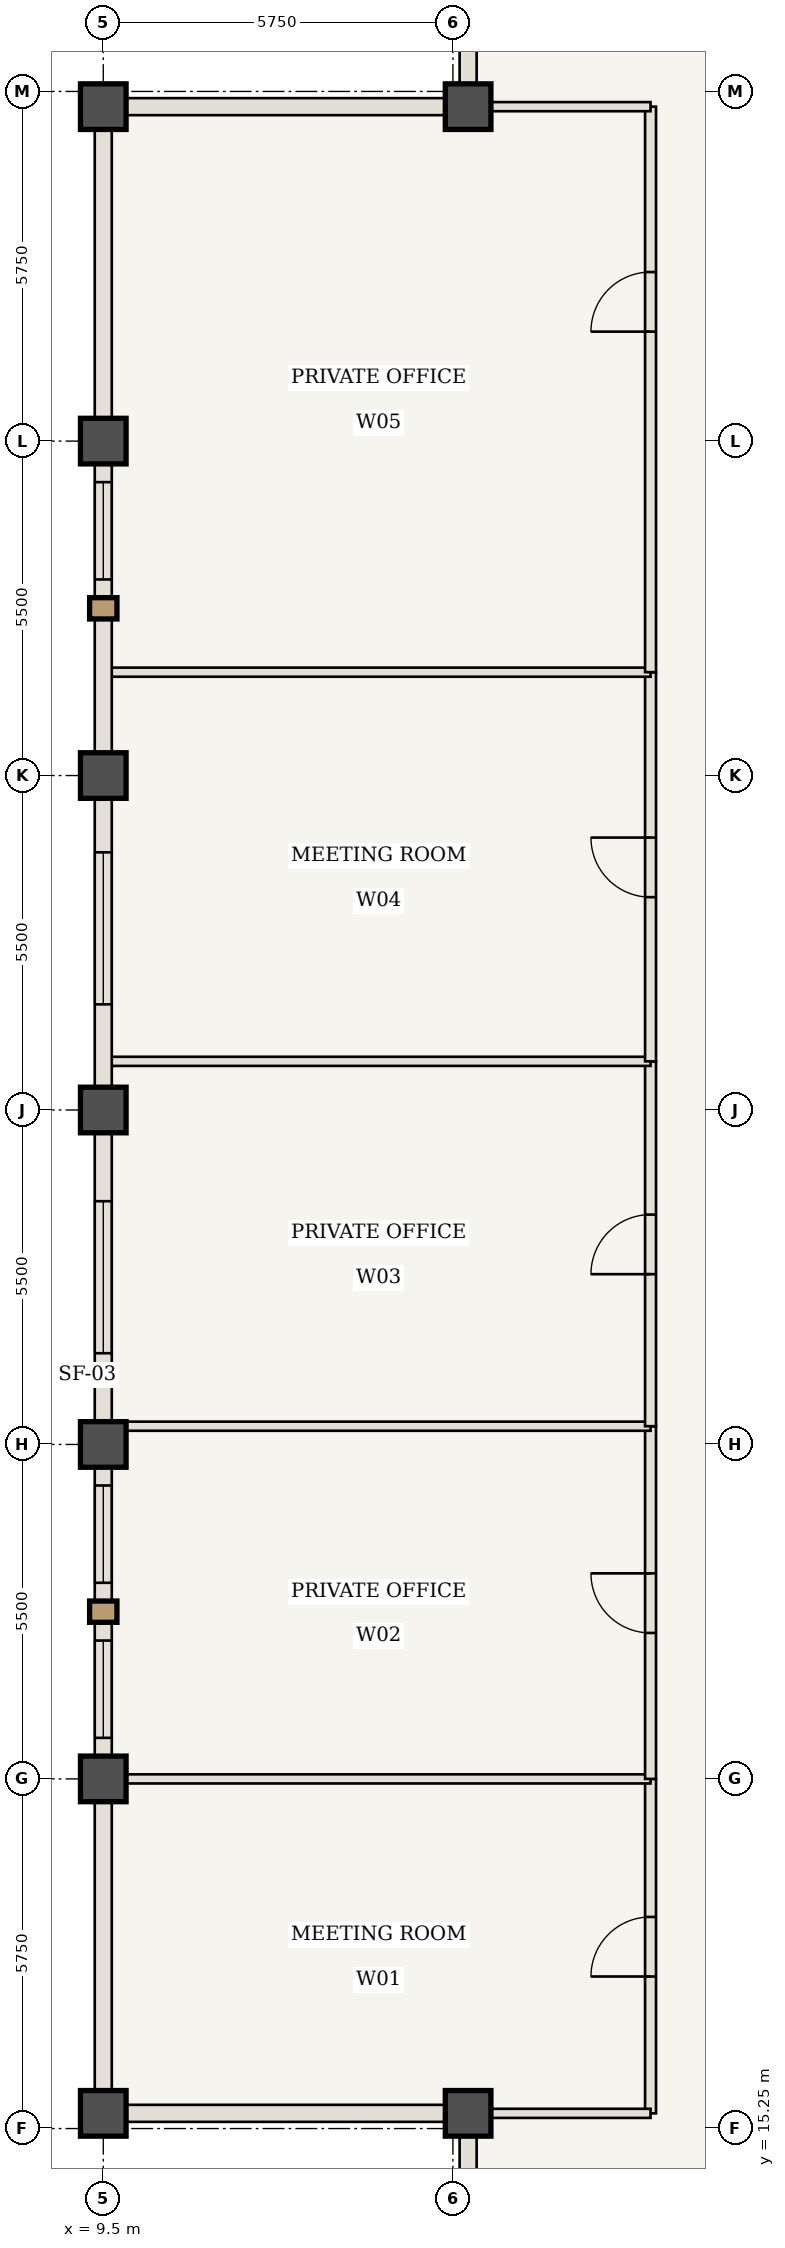
"""IFC4 building model, lengths in metres.
Left out: names, types, materials, properties, quantities, classifications, styles, units other than length and angle.
Written with IfcOpenShell. Run it as: python <this file> out.ifc"""

import sys

from ifc_helpers import new_model, si_unit, direction, frame, frame_2d, origin, origin_2d, place, context, subcontext, project, spatial, rectangle, extrude, element, fill, save


model = new_model("IFC4")
c1 = context("Model", 3, precision=1e-05, world=origin(), true_north=direction((0.0, 1.0)))
c2 = subcontext(c1, "Body", "Model", "MODEL_VIEW")
j1 = project(units=[si_unit("LENGTHUNIT", "METRE"), si_unit("PLANEANGLEUNIT", "RADIAN")], contexts=[c1])
p1 = place(None, origin())
s1 = spatial("IfcSite", under=j1, at=p1, CompositionType="ELEMENT")
p2 = place(p1, origin())
s2 = spatial("IfcBuilding", under=s1, at=p2, CompositionType="ELEMENT")
p3 = place(p2, frame((0.0, 0.0, 292.95)))
s3 = spatial("IfcBuildingStorey", under=s2, at=p3, CompositionType="ELEMENT", Elevation=292.95)
for number, where, z_axis, x_axis in (
    (1, (15.5, 15.5, 0.0), (0.0, 0.0, 1.0), (1.0, 0.0, 0.0)),
    (2, (9.5, 15.5, 0.0), (0.0, 0.0, 1.0), (1.0, 0.0, 0.0)),
    (3, (15.5, 48.5, 0.0), (0.0, 0.0, 1.0), (1.0, 0.0, 0.0)),
    (4, (9.5, 48.5, 0.0), (0.0, 0.0, 1.0), (1.0, 0.0, 0.0)),
    (5, (9.5, 21.0, 0.0), (0.0, 0.0, 1.0), (1.0, 0.0, 0.0)),
    (6, (9.5, 26.5, 0.0), (0.0, 0.0, 1.0), (1.0, 0.0, 0.0)),
    (7, (9.5, 32.0, 0.0), (0.0, 0.0, 1.0), (1.0, 0.0, 0.0)),
    (8, (9.5, 37.5, 0.0), (0.0, 0.0, 1.0), (1.0, 0.0, 0.0)),
    (9, (9.5, 43.0, 0.0), (0.0, 0.0, 1.0), (1.0, 0.0, 0.0)),
):
    element("IfcColumn", number, at=place(p3, frame(where, z_axis=z_axis, x_axis=x_axis)), inside=s3, PredefinedType="COLUMN", context=c2, shape_type="SweptSolid", body=[
        extrude(rectangle(XDim=0.75, YDim=0.75, at=origin_2d()), origin(), (0.0, 0.0, 1.0), 3.85),
    ])
p4 = place(p3, frame((18.5, 15.5, 0.0), z_axis=(0.0, 0.0, 1.0), x_axis=(0.0, 1.0, 0.0)))
e10 = element("IfcWall", 10, at=p4, inside=s3, PredefinedType="STANDARD", context=c2, shape_type="SweptSolid", body=[
    extrude(rectangle(XDim=5.5, YDim=0.18, at=frame_2d((2.75, 0.0))), origin(), (0.0, 0.0, 1.0), 3.685),
])
p5 = place(p4, frame((2.25, 0.0, 0.0)))
e11 = element("IfcOpeningElement", 11, at=p5, cuts=e10, PredefinedType="OPENING", context=c2, shape_type="SweptSolid", body=[
    extrude(rectangle(XDim=0.98, YDim=2.2, at=frame_2d((0.49, 1.1))), frame((0.0, 0.1, 0.0), z_axis=(0.0, -1.0, 0.0), x_axis=(1.0, 0.0, 0.0)), (0.0, 0.0, 1.0), 0.2),
])
p6 = place(p3, frame((9.56, 21.0, 0.0), z_axis=(0.0, 0.0, 1.0), x_axis=(1.0, 0.0, 0.0)))
e12 = element("IfcWall", 12, at=p6, inside=s3, PredefinedType="STANDARD", context=c2, shape_type="SweptSolid", body=[
    extrude(rectangle(XDim=8.94, YDim=0.15, at=frame_2d((4.47, 0.0))), origin(), (0.0, 0.0, 1.0), 3.685),
])
p7 = place(p3, frame((18.5, 21.0, 0.0), z_axis=(0.0, 0.0, 1.0), x_axis=(0.0, 1.0, 0.0)))
e13 = element("IfcWall", 13, at=p7, inside=s3, PredefinedType="STANDARD", context=c2, shape_type="SweptSolid", body=[
    extrude(rectangle(XDim=5.8, YDim=0.18, at=frame_2d((2.9, 0.0))), origin(), (0.0, 0.0, 1.0), 3.685),
])
p8 = place(p7, frame((2.4, 0.0, 0.0)))
e14 = element("IfcOpeningElement", 14, at=p8, cuts=e13, PredefinedType="OPENING", context=c2, shape_type="SweptSolid", body=[
    extrude(rectangle(XDim=0.98, YDim=2.2, at=frame_2d((0.49, 1.1))), frame((0.0, 0.1, 0.0), z_axis=(0.0, -1.0, 0.0), x_axis=(1.0, 0.0, 0.0)), (0.0, 0.0, 1.0), 0.2),
])
p9 = place(p3, frame((9.56, 26.8, 0.0), z_axis=(0.0, 0.0, 1.0), x_axis=(1.0, 0.0, 0.0)))
e15 = element("IfcWall", 15, at=p9, inside=s3, PredefinedType="STANDARD", context=c2, shape_type="SweptSolid", body=[
    extrude(rectangle(XDim=8.94, YDim=0.15, at=frame_2d((4.47, 0.0))), origin(), (0.0, 0.0, 1.0), 3.685),
])
p10 = place(p3, frame((18.5, 26.8, 0.0), z_axis=(0.0, 0.0, 1.0), x_axis=(0.0, 1.0, 0.0)))
e16 = element("IfcWall", 16, at=p10, inside=s3, PredefinedType="STANDARD", context=c2, shape_type="SweptSolid", body=[
    extrude(rectangle(XDim=6.0, YDim=0.18, at=frame_2d((3.0, 0.0))), origin(), (0.0, 0.0, 1.0), 3.685),
])
p11 = place(p10, frame((2.5, 0.0, 0.0)))
e17 = element("IfcOpeningElement", 17, at=p11, cuts=e16, PredefinedType="OPENING", context=c2, shape_type="SweptSolid", body=[
    extrude(rectangle(XDim=0.98, YDim=2.2, at=frame_2d((0.49, 1.1))), frame((0.0, 0.1, 0.0), z_axis=(0.0, -1.0, 0.0), x_axis=(1.0, 0.0, 0.0)), (0.0, 0.0, 1.0), 0.2),
])
p12 = place(p3, frame((9.56, 32.8, 0.0), z_axis=(0.0, 0.0, 1.0), x_axis=(1.0, 0.0, 0.0)))
e18 = element("IfcWall", 18, at=p12, inside=s3, PredefinedType="STANDARD", context=c2, shape_type="SweptSolid", body=[
    extrude(rectangle(XDim=8.94, YDim=0.15, at=frame_2d((4.47, 0.0))), origin(), (0.0, 0.0, 1.0), 3.685),
])
p13 = place(p3, frame((18.5, 32.8, 0.0), z_axis=(0.0, 0.0, 1.0), x_axis=(0.0, 1.0, 0.0)))
e19 = element("IfcWall", 19, at=p13, inside=s3, PredefinedType="STANDARD", context=c2, shape_type="SweptSolid", body=[
    extrude(rectangle(XDim=6.4, YDim=0.18, at=frame_2d((3.2, 0.0))), origin(), (0.0, 0.0, 1.0), 3.685),
])
p14 = place(p13, frame((2.7, 0.0, 0.0)))
e20 = element("IfcOpeningElement", 20, at=p14, cuts=e19, PredefinedType="OPENING", context=c2, shape_type="SweptSolid", body=[
    extrude(rectangle(XDim=0.98, YDim=2.2, at=frame_2d((0.49, 1.1))), frame((0.0, 0.1, 0.0), z_axis=(0.0, -1.0, 0.0), x_axis=(1.0, 0.0, 0.0)), (0.0, 0.0, 1.0), 0.2),
])
p15 = place(p3, frame((9.56, 39.2, 0.0), z_axis=(0.0, 0.0, 1.0), x_axis=(1.0, 0.0, 0.0)))
e21 = element("IfcWall", 21, at=p15, inside=s3, PredefinedType="STANDARD", context=c2, shape_type="SweptSolid", body=[
    extrude(rectangle(XDim=8.94, YDim=0.15, at=frame_2d((4.47, 0.0))), origin(), (0.0, 0.0, 1.0), 3.685),
])
p16 = place(p3, frame((18.5, 39.2, 0.0), z_axis=(0.0, 0.0, 1.0), x_axis=(0.0, 1.0, 0.0)))
e22 = element("IfcWall", 22, at=p16, inside=s3, PredefinedType="STANDARD", context=c2, shape_type="SweptSolid", body=[
    extrude(rectangle(XDim=9.3, YDim=0.18, at=frame_2d((4.65, 0.0))), origin(), (0.0, 0.0, 1.0), 3.685),
])
p17 = place(p16, frame((5.6, 0.0, 0.0)))
e23 = element("IfcOpeningElement", 23, at=p17, cuts=e22, PredefinedType="OPENING", context=c2, shape_type="SweptSolid", body=[
    extrude(rectangle(XDim=0.98, YDim=2.2, at=frame_2d((0.49, 1.1))), frame((0.0, 0.1, 0.0), z_axis=(0.0, -1.0, 0.0), x_axis=(1.0, 0.0, 0.0)), (0.0, 0.0, 1.0), 0.2),
])
for number, where, z_axis, x_axis in (
    (24, (15.5, 15.5, 0.0), (0.0, 0.0, 1.0), (1.0, 0.0, 0.0)),
    (25, (15.5, 48.5, 0.0), (0.0, 0.0, 1.0), (1.0, 0.0, 0.0)),
):
    element("IfcWall", number, at=place(p3, frame(where, z_axis=z_axis, x_axis=x_axis)), inside=s3, PredefinedType="STANDARD", context=c2, shape_type="SweptSolid", body=[
        extrude(rectangle(XDim=3.0, YDim=0.15, at=frame_2d((1.5, 0.0))), origin(), (0.0, 0.0, 1.0), 3.685),
    ])
p18 = place(p3, frame((9.5, 15.5, 0.0), z_axis=(0.0, 0.0, 1.0), x_axis=(0.0, 1.0, 0.0)))
e26 = element("IfcWall", 26, at=p18, inside=s3, PredefinedType="USERDEFINED", context=c2, shape_type="SweptSolid", body=[
    extrude(rectangle(XDim=5.5, YDim=0.28, at=frame_2d((2.75, 0.0))), origin(), (0.0, 0.0, 1.0), 2.985),
])
p19 = place(p3, frame((9.5, 21.0, 0.0), z_axis=(0.0, 0.0, 1.0), x_axis=(0.0, 1.0, 0.0)))
e27 = element("IfcWall", 27, at=p19, inside=s3, PredefinedType="USERDEFINED", context=c2, shape_type="SweptSolid", body=[
    extrude(rectangle(XDim=5.5, YDim=0.28, at=frame_2d((2.75, 0.0))), origin(), (0.0, 0.0, 1.0), 2.985),
])
p20 = place(p19, frame((0.675, 0.0, 0.85)))
e28 = element("IfcOpeningElement", 28, at=p20, cuts=e27, PredefinedType="OPENING", context=c2, shape_type="SweptSolid", body=[
    extrude(rectangle(XDim=1.6, YDim=1.935, at=frame_2d((0.8, 0.968))), frame((0.0, 0.15, 0.0), z_axis=(0.0, -1.0, 0.0), x_axis=(1.0, 0.0, 0.0)), (0.0, 0.0, 1.0), 0.3),
])
p21 = place(p19, frame((3.225, 0.0, 0.85)))
e29 = element("IfcOpeningElement", 29, at=p21, cuts=e27, PredefinedType="OPENING", context=c2, shape_type="SweptSolid", body=[
    extrude(rectangle(XDim=1.6, YDim=1.935, at=frame_2d((0.8, 0.968))), frame((0.0, 0.15, 0.0), z_axis=(0.0, -1.0, 0.0), x_axis=(1.0, 0.0, 0.0)), (0.0, 0.0, 1.0), 0.3),
])
p22 = place(p3, frame((9.5, 26.5, 0.0), z_axis=(0.0, 0.0, 1.0), x_axis=(0.0, 1.0, 0.0)))
e30 = element("IfcWall", 30, at=p22, inside=s3, PredefinedType="USERDEFINED", context=c2, shape_type="SweptSolid", body=[
    extrude(rectangle(XDim=5.5, YDim=0.28, at=frame_2d((2.75, 0.0))), origin(), (0.0, 0.0, 1.0), 2.985),
])
p23 = place(p22, frame((1.5, 0.0, 0.85)))
e31 = element("IfcOpeningElement", 31, at=p23, cuts=e30, PredefinedType="OPENING", context=c2, shape_type="SweptSolid", body=[
    extrude(rectangle(XDim=2.5, YDim=1.935, at=frame_2d((1.25, 0.968))), frame((0.0, 0.15, 0.0), z_axis=(0.0, -1.0, 0.0), x_axis=(1.0, 0.0, 0.0)), (0.0, 0.0, 1.0), 0.3),
])
p24 = place(p3, frame((9.5, 32.0, 0.0), z_axis=(0.0, 0.0, 1.0), x_axis=(0.0, 1.0, 0.0)))
e32 = element("IfcWall", 32, at=p24, inside=s3, PredefinedType="USERDEFINED", context=c2, shape_type="SweptSolid", body=[
    extrude(rectangle(XDim=5.5, YDim=0.28, at=frame_2d((2.75, 0.0))), origin(), (0.0, 0.0, 1.0), 2.985),
])
p25 = place(p24, frame((1.738, 0.0, 0.85)))
e33 = element("IfcOpeningElement", 33, at=p25, cuts=e32, PredefinedType="OPENING", context=c2, shape_type="SweptSolid", body=[
    extrude(rectangle(XDim=2.5, YDim=1.935, at=frame_2d((1.25, 0.968))), frame((0.0, 0.15, 0.0), z_axis=(0.0, -1.0, 0.0), x_axis=(1.0, 0.0, 0.0)), (0.0, 0.0, 1.0), 0.3),
])
p26 = place(p3, frame((9.5, 37.5, 0.0), z_axis=(0.0, 0.0, 1.0), x_axis=(0.0, 1.0, 0.0)))
e34 = element("IfcWall", 34, at=p26, inside=s3, PredefinedType="USERDEFINED", context=c2, shape_type="SweptSolid", body=[
    extrude(rectangle(XDim=5.5, YDim=0.28, at=frame_2d((2.75, 0.0))), origin(), (0.0, 0.0, 1.0), 2.985),
])
p27 = place(p26, frame((3.225, 0.0, 0.85)))
e35 = element("IfcOpeningElement", 35, at=p27, cuts=e34, PredefinedType="OPENING", context=c2, shape_type="SweptSolid", body=[
    extrude(rectangle(XDim=1.6, YDim=1.935, at=frame_2d((0.8, 0.968))), frame((0.0, 0.15, 0.0), z_axis=(0.0, -1.0, 0.0), x_axis=(1.0, 0.0, 0.0)), (0.0, 0.0, 1.0), 0.3),
])
p28 = place(p3, frame((9.5, 43.0, 0.0), z_axis=(0.0, 0.0, 1.0), x_axis=(0.0, 1.0, 0.0)))
e36 = element("IfcWall", 36, at=p28, inside=s3, PredefinedType="USERDEFINED", context=c2, shape_type="SweptSolid", body=[
    extrude(rectangle(XDim=5.5, YDim=0.28, at=frame_2d((2.75, 0.0))), origin(), (0.0, 0.0, 1.0), 2.985),
])
for number, where, z_axis, x_axis in (
    (37, (15.5, 9.5, 0.0), (0.0, 0.0, 1.0), (0.0, 1.0, 0.0)),
    (38, (15.5, 15.5, 0.0), (0.0, 0.0, 1.0), (-1.0, 0.0, 0.0)),
    (39, (15.5, 48.5, 0.0), (0.0, 0.0, 1.0), (0.0, 1.0, 0.0)),
    (40, (9.5, 48.5, 0.0), (0.0, 0.0, 1.0), (1.0, 0.0, 0.0)),
):
    element("IfcWall", number, at=place(p3, frame(where, z_axis=z_axis, x_axis=x_axis)), inside=s3, PredefinedType="USERDEFINED", context=c2, shape_type="SweptSolid", body=[
        extrude(rectangle(XDim=6.0, YDim=0.28, at=frame_2d((3.0, 0.0))), origin(), (0.0, 0.0, 1.0), 2.985),
    ])
p29 = place(p5, origin())
e41 = element("IfcDoor", 41, at=p29, inside=s3, OperationType="SINGLE_SWING_LEFT", PredefinedType="DOOR", context=c2, shape_type="SweptSolid", body=[
    extrude(rectangle(XDim=0.98, YDim=2.2, at=frame_2d((0.49, 1.1))), frame((0.0, 0.025, 0.0), z_axis=(0.0, -1.0, 0.0), x_axis=(1.0, 0.0, 0.0)), (0.0, 0.0, 1.0), 0.05),
])
fill(e11, e41)
p30 = place(p8, origin())
e42 = element("IfcDoor", 42, at=p30, inside=s3, OperationType="SINGLE_SWING_RIGHT", PredefinedType="DOOR", context=c2, shape_type="SweptSolid", body=[
    extrude(rectangle(XDim=0.98, YDim=2.2, at=frame_2d((0.49, 1.1))), frame((0.0, 0.025, 0.0), z_axis=(0.0, -1.0, 0.0), x_axis=(1.0, 0.0, 0.0)), (0.0, 0.0, 1.0), 0.05),
])
fill(e14, e42)
p31 = place(p11, origin())
e43 = element("IfcDoor", 43, at=p31, inside=s3, OperationType="SINGLE_SWING_LEFT", PredefinedType="DOOR", context=c2, shape_type="SweptSolid", body=[
    extrude(rectangle(XDim=0.98, YDim=2.2, at=frame_2d((0.49, 1.1))), frame((0.0, 0.025, 0.0), z_axis=(0.0, -1.0, 0.0), x_axis=(1.0, 0.0, 0.0)), (0.0, 0.0, 1.0), 0.05),
])
fill(e17, e43)
p32 = place(p14, origin())
e44 = element("IfcDoor", 44, at=p32, inside=s3, OperationType="SINGLE_SWING_RIGHT", PredefinedType="DOOR", context=c2, shape_type="SweptSolid", body=[
    extrude(rectangle(XDim=0.98, YDim=2.2, at=frame_2d((0.49, 1.1))), frame((0.0, 0.025, 0.0), z_axis=(0.0, -1.0, 0.0), x_axis=(1.0, 0.0, 0.0)), (0.0, 0.0, 1.0), 0.05),
])
fill(e20, e44)
p33 = place(p17, origin())
e45 = element("IfcDoor", 45, at=p33, inside=s3, OperationType="SINGLE_SWING_LEFT", PredefinedType="DOOR", context=c2, shape_type="SweptSolid", body=[
    extrude(rectangle(XDim=0.98, YDim=2.2, at=frame_2d((0.49, 1.1))), frame((0.0, 0.025, 0.0), z_axis=(0.0, -1.0, 0.0), x_axis=(1.0, 0.0, 0.0)), (0.0, 0.0, 1.0), 0.05),
])
fill(e23, e45)
p34 = place(p20, origin())
e46 = element("IfcWindow", 46, at=p34, inside=s3, PartitioningType="SINGLE_PANEL", PredefinedType="WINDOW", context=c2, shape_type="SweptSolid", body=[
    extrude(rectangle(XDim=1.6, YDim=1.935, at=frame_2d((0.8, 0.968))), frame((0.0, 0.03, 0.0), z_axis=(0.0, -1.0, 0.0), x_axis=(1.0, 0.0, 0.0)), (0.0, 0.0, 1.0), 0.06),
])
fill(e28, e46)
p35 = place(p21, origin())
e47 = element("IfcWindow", 47, at=p35, inside=s3, PartitioningType="SINGLE_PANEL", PredefinedType="WINDOW", context=c2, shape_type="SweptSolid", body=[
    extrude(rectangle(XDim=1.6, YDim=1.935, at=frame_2d((0.8, 0.968))), frame((0.0, 0.03, 0.0), z_axis=(0.0, -1.0, 0.0), x_axis=(1.0, 0.0, 0.0)), (0.0, 0.0, 1.0), 0.06),
])
fill(e29, e47)
p36 = place(p23, origin())
e48 = element("IfcWindow", 48, at=p36, inside=s3, PartitioningType="SINGLE_PANEL", PredefinedType="WINDOW", context=c2, shape_type="SweptSolid", body=[
    extrude(rectangle(XDim=2.5, YDim=1.935, at=frame_2d((1.25, 0.968))), frame((0.0, 0.03, 0.0), z_axis=(0.0, -1.0, 0.0), x_axis=(1.0, 0.0, 0.0)), (0.0, 0.0, 1.0), 0.06),
])
fill(e31, e48)
p37 = place(p25, origin())
e49 = element("IfcWindow", 49, at=p37, inside=s3, PartitioningType="SINGLE_PANEL", PredefinedType="WINDOW", context=c2, shape_type="SweptSolid", body=[
    extrude(rectangle(XDim=2.5, YDim=1.935, at=frame_2d((1.25, 0.968))), frame((0.0, 0.03, 0.0), z_axis=(0.0, -1.0, 0.0), x_axis=(1.0, 0.0, 0.0)), (0.0, 0.0, 1.0), 0.06),
])
fill(e33, e49)
p38 = place(p27, origin())
e50 = element("IfcWindow", 50, at=p38, inside=s3, PartitioningType="SINGLE_PANEL", PredefinedType="WINDOW", context=c2, shape_type="SweptSolid", body=[
    extrude(rectangle(XDim=1.6, YDim=1.935, at=frame_2d((0.8, 0.968))), frame((0.0, 0.03, 0.0), z_axis=(0.0, -1.0, 0.0), x_axis=(1.0, 0.0, 0.0)), (0.0, 0.0, 1.0), 0.06),
])
fill(e35, e50)
save(model, sys.argv[1])
